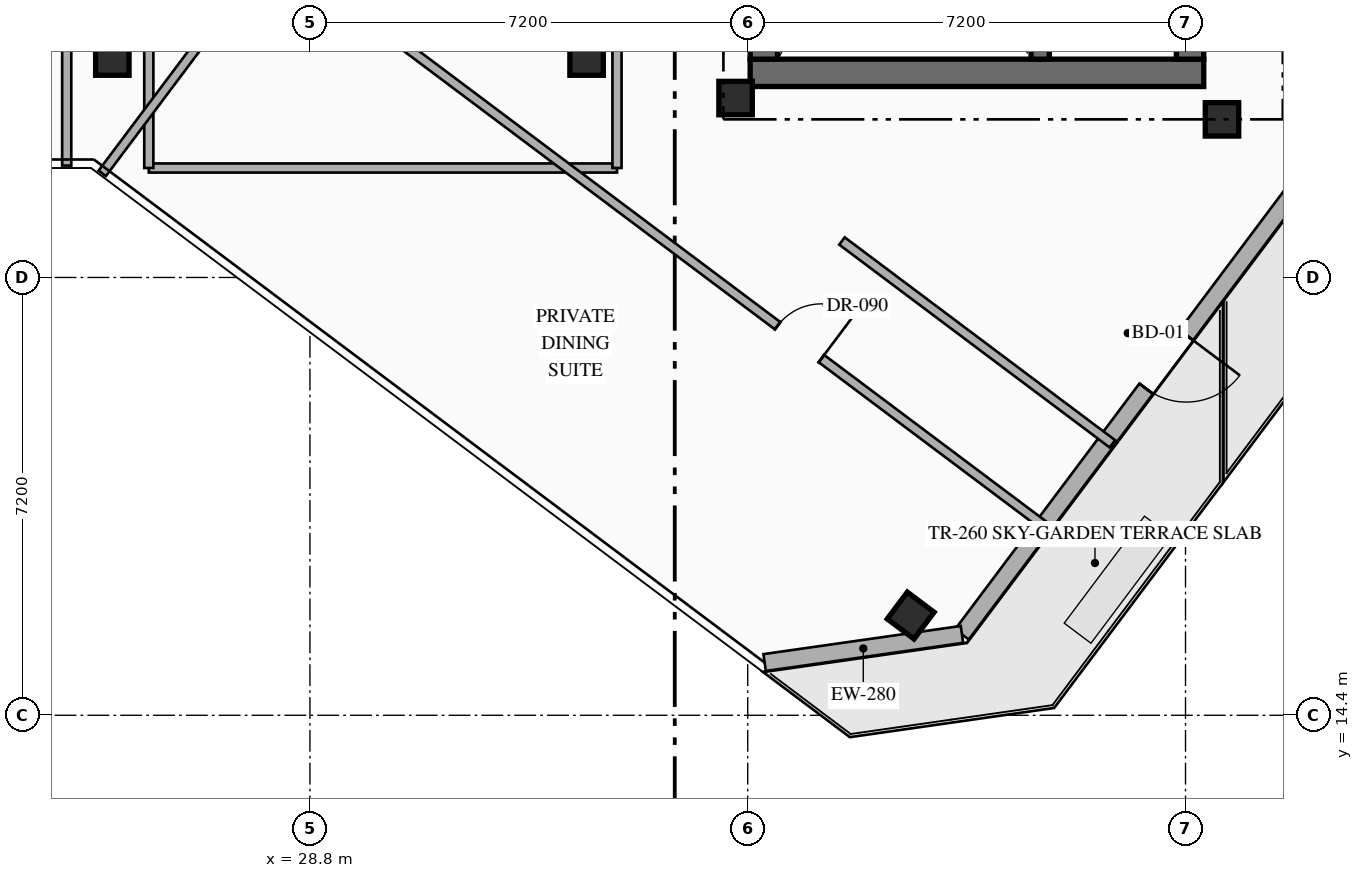
"""IFC4 building model, lengths in metres.
Left out: names, types, materials, properties, quantities, classifications, styles, units other than length and angle.
Written with IfcOpenShell. Run it as: python <this file> out.ifc"""

import sys

from ifc_helpers import new_model, si_unit, direction, frame, frame_2d, origin, origin_2d, place, context, subcontext, project, spatial, rectangle, hollow_rectangle, extrude, element, fill, save


model = new_model("IFC4")
c1 = context("Model", 3, precision=1e-05, world=origin(), true_north=direction((0.0, 1.0)))
c2 = subcontext(c1, "Body", "Model", "MODEL_VIEW")
j1 = project(units=[si_unit("LENGTHUNIT", "METRE"), si_unit("PLANEANGLEUNIT", "RADIAN")], contexts=[c1])
p1 = place(None, origin())
s1 = spatial("IfcSite", under=j1, at=p1, CompositionType="ELEMENT")
p2 = place(p1, origin())
s2 = spatial("IfcBuilding", under=s1, at=p2, CompositionType="ELEMENT")
p3 = place(p2, frame((0.0, 0.0, 281.95)))
s3 = spatial("IfcBuildingStorey", under=s2, at=p3, CompositionType="ELEMENT", Elevation=281.95)
p4 = place(p3, frame((36.04, 24.965, 0.0), z_axis=(0.0, 0.0, 1.0), x_axis=(1.0, 0.0, 0.0)))
e1 = element("IfcWall", 1, at=p4, inside=s3, PredefinedType="SHEAR", context=c2, shape_type="SweptSolid", body=[
    extrude(rectangle(XDim=7.46, YDim=0.45, at=frame_2d((3.73, 0.0))), origin(), (0.0, 0.0, 1.0), 4.0),
])
p5 = place(p3, frame((36.265, 25.19, 0.0), z_axis=(0.0, 0.0, 1.0), x_axis=(0.0, 1.0, 0.0)))
e2 = element("IfcWall", 2, at=p5, inside=s3, PredefinedType="SHEAR", context=c2, shape_type="SweptSolid", body=[
    extrude(rectangle(XDim=9.48, YDim=0.45, at=frame_2d((4.74, 0.0))), origin(), (0.0, 0.0, 1.0), 4.0),
])
p6 = place(p3, frame((43.275, 25.19, 0.0), z_axis=(0.0, 0.0, 1.0), x_axis=(0.0, 1.0, 0.0)))
e3 = element("IfcWall", 3, at=p6, inside=s3, PredefinedType="SHEAR", context=c2, shape_type="SweptSolid", body=[
    extrude(rectangle(XDim=9.48, YDim=0.45, at=frame_2d((4.74, 0.0))), origin(), (0.0, 0.0, 1.0), 4.0),
])
p7 = place(p6, frame((1.21, 0.0, 0.0)))
e4 = element("IfcOpeningElement", 4, at=p7, cuts=e3, PredefinedType="OPENING", context=c2, shape_type="SweptSolid", body=[
    extrude(rectangle(XDim=0.85, YDim=2.08, at=frame_2d((0.425, 1.04))), frame((0.0, 0.235, 0.0), z_axis=(0.0, -1.0, 0.0), x_axis=(1.0, 0.0, 0.0)), (0.0, 0.0, 1.0), 0.47),
])
p8 = place(p6, frame((4.46, 0.0, 0.0)))
e5 = element("IfcOpeningElement", 5, at=p8, cuts=e3, PredefinedType="OPENING", context=c2, shape_type="SweptSolid", body=[
    extrude(rectangle(XDim=0.85, YDim=2.08, at=frame_2d((0.425, 1.04))), frame((0.0, 0.235, 0.0), z_axis=(0.0, -1.0, 0.0), x_axis=(1.0, 0.0, 0.0)), (0.0, 0.0, 1.0), 0.47),
])
p9 = place(p3, frame((40.81, 25.19, 0.0), z_axis=(0.0, 0.0, 1.0), x_axis=(0.0, 1.0, 0.0)))
e6 = element("IfcWall", 6, at=p9, inside=s3, PredefinedType="SHEAR", context=c2, shape_type="SweptSolid", body=[
    extrude(rectangle(XDim=9.48, YDim=0.3, at=frame_2d((4.74, 0.0))), origin(), (0.0, 0.0, 1.0), 4.0),
])
for number, where, z_axis, x_axis in (
    (7, (35.8, 24.55, 0.0), (0.0, 0.0, 1.0), (1.0, 0.0, 0.0)),
    (8, (43.8, 24.2, 0.0), (0.0, 0.0, 1.0), (1.0, 0.0, 0.0)),
    (9, (25.55, 25.2, 0.0), (0.0, 0.0, 1.0), (1.0, 0.0, 0.0)),
    (10, (33.35, 25.2, 0.0), (0.0, 0.0, 1.0), (1.0, 0.0, 0.0)),
    (11, (38.68, 16.04, 0.0), (0.0, 0.0, 1.0), (0.8, -0.6, 0.0)),
):
    element("IfcColumn", number, at=place(p3, frame(where, z_axis=z_axis, x_axis=x_axis)), inside=s3, PredefinedType="COLUMN", context=c2, shape_type="SweptSolid", body=[
        extrude(hollow_rectangle(XDim=0.55, YDim=0.55, WallThickness=0.022, at=origin_2d()), origin(), (0.0, 0.0, 1.0), 4.0),
    ])
p10 = place(p3, frame((52.053, 32.438, 0.0), z_axis=(0.0, 0.0, 1.0), x_axis=(-0.599970072971, -0.800022444397, 0.0)))
e12 = element("IfcWall", 12, at=p10, inside=s3, PredefinedType="STANDARD", context=c2, shape_type="SweptSolid", body=[
    extrude(rectangle(XDim=20.885, YDim=0.28, at=frame_2d((10.442, 0.0))), origin(), (0.0, 0.0, 1.0), 3.75),
])
p11 = place(p10, frame((14.734, 0.0, 0.0)))
e13 = element("IfcOpeningElement", 13, at=p11, cuts=e12, PredefinedType="OPENING", context=c2, shape_type="SweptSolid", body=[
    extrude(rectangle(XDim=1.1, YDim=2.2, at=frame_2d((0.55, 1.1))), frame((0.0, 0.15, 0.0), z_axis=(0.0, -1.0, 0.0), x_axis=(1.0, 0.0, 0.0)), (0.0, 0.0, 1.0), 0.3),
])
p12 = place(p10, frame((6.842, 0.0, 0.0)))
e14 = element("IfcOpeningElement", 14, at=p12, cuts=e12, PredefinedType="OPENING", context=c2, shape_type="SweptSolid", body=[
    extrude(rectangle(XDim=1.1, YDim=2.2, at=frame_2d((0.55, 1.1))), frame((0.0, 0.15, 0.0), z_axis=(0.0, -1.0, 0.0), x_axis=(1.0, 0.0, 0.0)), (0.0, 0.0, 1.0), 0.3),
])
p13 = place(p10, frame((3.962, 0.0, 0.75)))
e15 = element("IfcOpeningElement", 15, at=p13, cuts=e12, PredefinedType="OPENING", context=c2, shape_type="SweptSolid", body=[
    extrude(rectangle(XDim=2.2, YDim=2.2, at=frame_2d((1.1, 1.1))), frame((0.0, 0.15, 0.0), z_axis=(0.0, -1.0, 0.0), x_axis=(1.0, 0.0, 0.0)), (0.0, 0.0, 1.0), 0.3),
])
p14 = place(p3, frame((39.523, 15.73, 0.0), z_axis=(0.0, 0.0, 1.0), x_axis=(-0.989977778067, -0.141223223777, 0.0)))
e16 = element("IfcWall", 16, at=p14, inside=s3, PredefinedType="STANDARD", context=c2, shape_type="SweptSolid", body=[
    extrude(rectangle(XDim=3.278, YDim=0.28, at=frame_2d((1.639, 0.0))), origin(), (0.0, 0.0, 1.0), 3.75),
])
p15 = place(p3, frame((26.15, 23.4, 0.0), z_axis=(0.0, 0.0, 1.0), x_axis=(1.0, 0.0, 0.0)))
e17 = element("IfcWall", 17, at=p15, inside=s3, PredefinedType="PARTITIONING", context=c2, shape_type="SweptSolid", body=[
    extrude(rectangle(XDim=7.7, YDim=0.15, at=frame_2d((3.85, 0.0))), origin(), (0.0, 0.0, 1.0), 3.75),
])
for number, where, z_axis, x_axis in (
    (18, (26.15, 23.4, 0.0), (0.0, 0.0, 1.0), (0.0, 1.0, 0.0)),
    (19, (33.85, 23.4, 0.0), (0.0, 0.0, 1.0), (0.0, 1.0, 0.0)),
):
    element("IfcWall", number, at=place(p3, frame(where, z_axis=z_axis, x_axis=x_axis)), inside=s3, PredefinedType="PARTITIONING", context=c2, shape_type="SweptSolid", body=[
        extrude(rectangle(XDim=6.65, YDim=0.15, at=frame_2d((3.325, 0.0))), origin(), (0.0, 0.0, 1.0), 3.75),
    ])
p16 = place(p3, frame((24.8, 23.44, 0.0), z_axis=(0.0, 0.0, 1.0), x_axis=(0.0, 1.0, 0.0)))
e20 = element("IfcWall", 20, at=p16, inside=s3, PredefinedType="PARTITIONING", context=c2, shape_type="SweptSolid", body=[
    extrude(rectangle(XDim=6.96, YDim=0.15, at=frame_2d((3.48, 0.0))), origin(), (0.0, 0.0, 1.0), 3.75),
])
p17 = place(p3, frame((28.18, 27.04, 0.0), z_axis=(0.0, 0.0, 1.0), x_axis=(0.80000367127, -0.599995104942, 0.0)))
e21 = element("IfcWall", 21, at=p17, inside=s3, PredefinedType="PARTITIONING", context=c2, shape_type="SweptSolid", body=[
    extrude(rectangle(XDim=15.96, YDim=0.15, at=frame_2d((7.98, 0.0))), origin(), (0.0, 0.0, 1.0), 3.75),
])
p18 = place(p17, frame((10.39, 0.0, 0.0)))
e22 = element("IfcOpeningElement", 22, at=p18, cuts=e21, PredefinedType="OPENING", context=c2, shape_type="SweptSolid", body=[
    extrude(rectangle(XDim=0.9, YDim=2.15, at=frame_2d((0.45, 1.075))), frame((0.0, 0.085, 0.0), z_axis=(0.0, -1.0, 0.0), x_axis=(1.0, 0.0, 0.0)), (0.0, 0.0, 1.0), 0.17),
])
p19 = place(p3, frame((25.384, 23.312, 0.0), z_axis=(0.0, 0.0, 1.0), x_axis=(0.599983234706, 0.800012573696, 0.0)))
e23 = element("IfcWall", 23, at=p19, inside=s3, PredefinedType="PARTITIONING", context=c2, shape_type="SweptSolid", body=[
    extrude(rectangle(XDim=4.66, YDim=0.15, at=frame_2d((2.33, 0.0))), origin(), (0.0, 0.0, 1.0), 3.75),
])
p20 = place(p3, frame((37.55, 22.2, 0.0), z_axis=(0.0, 0.0, 1.0), x_axis=(0.800005269228, -0.599992974298, 0.0)))
e24 = element("IfcWall", 24, at=p20, inside=s3, PredefinedType="PARTITIONING", context=c2, shape_type="SweptSolid", body=[
    extrude(rectangle(XDim=5.56, YDim=0.15, at=frame_2d((2.78, 0.0))), origin(), (0.0, 0.0, 1.0), 3.75),
])
p21 = place(p11, origin())
e25 = element("IfcDoor", 25, at=p21, inside=s3, OperationType="SINGLE_SWING_LEFT", PredefinedType="DOOR", context=c2, shape_type="SweptSolid", body=[
    extrude(rectangle(XDim=1.1, YDim=2.2, at=frame_2d((0.55, 1.1))), frame((0.0, 0.025, 0.0), z_axis=(0.0, -1.0, 0.0), x_axis=(1.0, 0.0, 0.0)), (0.0, 0.0, 1.0), 0.05),
])
fill(e13, e25)
p22 = place(p18, origin())
e26 = element("IfcDoor", 26, at=p22, inside=s3, OperationType="SINGLE_SWING_RIGHT", PredefinedType="DOOR", context=c2, shape_type="SweptSolid", body=[
    extrude(rectangle(XDim=0.9, YDim=2.15, at=frame_2d((0.45, 1.075))), frame((0.0, 0.025, 0.0), z_axis=(0.0, -1.0, 0.0), x_axis=(1.0, 0.0, 0.0)), (0.0, 0.0, 1.0), 0.05),
])
fill(e22, e26)
save(model, sys.argv[1])
